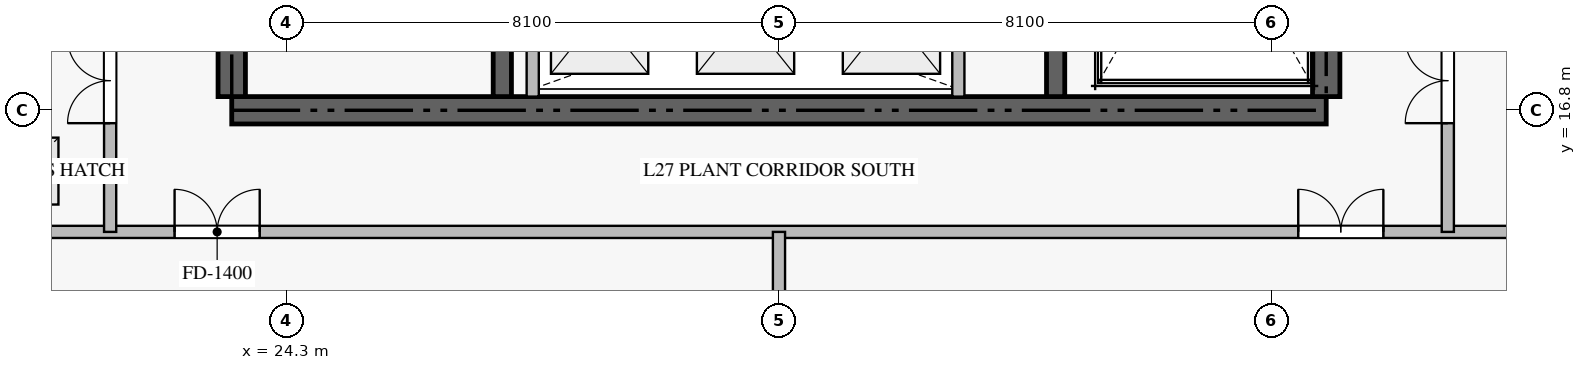
"""IFC4 building model, lengths in metres.
Left out: names, types, materials, properties, quantities, classifications, styles, units other than length and angle.
Written with IfcOpenShell. Run it as: python <this file> out.ifc"""

import sys

from ifc_helpers import new_model, si_unit, direction, frame, frame_2d, origin, origin_2d, place, context, subcontext, project, spatial, rectangle, extrude, source, transform, mapped, element, fill, save


model = new_model("IFC4")
c1 = context("Model", 3, precision=1e-05, world=origin(), true_north=direction((0.0, 1.0)))
c2 = subcontext(c1, "Body", "Model", "MODEL_VIEW")
j1 = project(units=[si_unit("LENGTHUNIT", "METRE"), si_unit("PLANEANGLEUNIT", "RADIAN")], contexts=[c1])
p1 = place(None, origin())
s1 = spatial("IfcSite", under=j1, at=p1, CompositionType="ELEMENT")
p2 = place(p1, origin())
s2 = spatial("IfcBuilding", under=s1, at=p2, CompositionType="ELEMENT")
p3 = place(p2, frame((0.0, 0.0, 109.2)))
s3 = spatial("IfcBuildingStorey", under=s2, at=p3, CompositionType="ELEMENT", Elevation=109.2)
p4 = place(p3, frame((23.4, 16.8, -0.36), z_axis=(0.0, 0.0, 1.0), x_axis=(1.0, 0.0, 0.0)))
e1 = element("IfcWall", 1, at=p4, inside=s3, PredefinedType="SHEAR", context=c2, shape_type="SweptSolid", body=[
    extrude(rectangle(XDim=18.0, YDim=0.45, at=frame_2d((9.0, 0.0))), origin(), (0.0, 0.0, 1.0), 5.998),
])
p5 = place(p3, frame((23.4, 17.025, -0.36), z_axis=(0.0, 0.0, 1.0), x_axis=(0.0, 1.0, 0.0)))
e2 = element("IfcWall", 2, at=p5, inside=s3, PredefinedType="SHEAR", context=c2, shape_type="SweptSolid", body=[
    extrude(rectangle(XDim=4.825, YDim=0.45, at=frame_2d((2.413, 0.0))), origin(), (0.0, 0.0, 1.0), 5.998),
])
p6 = place(p3, frame((41.4, 17.025, -0.36), z_axis=(0.0, 0.0, 1.0), x_axis=(0.0, 1.0, 0.0)))
e3 = element("IfcWall", 3, at=p6, inside=s3, PredefinedType="SHEAR", context=c2, shape_type="SweptSolid", body=[
    extrude(rectangle(XDim=8.325, YDim=0.45, at=frame_2d((4.163, 0.0))), origin(), (0.0, 0.0, 1.0), 5.998),
])
p7 = place(p3, frame((27.85, 17.025, -0.36), z_axis=(0.0, 0.0, 1.0), x_axis=(0.0, 1.0, 0.0)))
e4 = element("IfcWall", 4, at=p7, inside=s3, PredefinedType="SHEAR", context=c2, shape_type="SweptSolid", body=[
    extrude(rectangle(XDim=4.825, YDim=0.3, at=frame_2d((2.413, 0.0))), origin(), (0.0, 0.0, 1.0), 5.998),
])
p8 = place(p3, frame((36.95, 17.025, -0.36), z_axis=(0.0, 0.0, 1.0), x_axis=(0.0, 1.0, 0.0)))
e5 = element("IfcWall", 5, at=p8, inside=s3, PredefinedType="SHEAR", context=c2, shape_type="SweptSolid", body=[
    extrude(rectangle(XDim=8.325, YDim=0.3, at=frame_2d((4.163, 0.0))), origin(), (0.0, 0.0, 1.0), 5.998),
])
for number, where, z_axis, x_axis in (
    (6, (28.35, 17.025, 0.0), (0.0, 0.0, 1.0), (0.0, 1.0, 0.0)),
    (7, (35.35, 17.025, 0.0), (0.0, 0.0, 1.0), (0.0, 1.0, 0.0)),
):
    element("IfcWall", number, at=place(p3, frame(where, z_axis=z_axis, x_axis=x_axis)), inside=s3, PredefinedType="STANDARD", context=c2, shape_type="SweptSolid", body=[
        extrude(rectangle(XDim=2.525, YDim=0.2, at=frame_2d((1.263, 0.0))), origin(), (0.0, 0.0, 1.0), 5.64),
    ])
p9 = place(p3, frame((15.2, 14.8, 0.0), z_axis=(0.0, 0.0, 1.0), x_axis=(1.0, 0.0, 0.0)))
e8 = element("IfcWall", 8, at=p9, inside=s3, PredefinedType="STANDARD", context=c2, shape_type="SweptSolid", body=[
    extrude(rectangle(XDim=34.4, YDim=0.2, at=frame_2d((17.2, 0.0))), origin(), (0.0, 0.0, 1.0), 5.64),
])
p10 = place(p9, frame((7.26, 0.0, 0.0)))
e9 = element("IfcOpeningElement", 9, at=p10, cuts=e8, PredefinedType="OPENING", context=c2, shape_type="SweptSolid", body=[
    extrude(rectangle(XDim=1.4, YDim=2.2, at=frame_2d((0.7, 1.1))), frame((0.0, 0.11, 0.0), z_axis=(0.0, -1.0, 0.0), x_axis=(1.0, 0.0, 0.0)), (0.0, 0.0, 1.0), 0.22),
])
p11 = place(p9, frame((25.74, 0.0, 0.0)))
e10 = element("IfcOpeningElement", 10, at=p11, cuts=e8, PredefinedType="OPENING", context=c2, shape_type="SweptSolid", body=[
    extrude(rectangle(XDim=1.4, YDim=2.2, at=frame_2d((0.7, 1.1))), frame((0.0, 0.11, 0.0), z_axis=(0.0, -1.0, 0.0), x_axis=(1.0, 0.0, 0.0)), (0.0, 0.0, 1.0), 0.22),
])
p12 = place(p3, frame((32.4, 9.0, 0.0), z_axis=(0.0, 0.0, 1.0), x_axis=(0.0, 1.0, 0.0)))
e11 = element("IfcWall", 11, at=p12, inside=s3, PredefinedType="STANDARD", context=c2, shape_type="SweptSolid", body=[
    extrude(rectangle(XDim=5.8, YDim=0.2, at=frame_2d((2.9, 0.0))), origin(), (0.0, 0.0, 1.0), 5.64),
])
p13 = place(p3, frame((21.4, 14.8, 0.0), z_axis=(0.0, 0.0, 1.0), x_axis=(0.0, 1.0, 0.0)))
e12 = element("IfcWall", 12, at=p13, inside=s3, PredefinedType="STANDARD", context=c2, shape_type="SweptSolid", body=[
    extrude(rectangle(XDim=8.85, YDim=0.2, at=frame_2d((4.425, 0.0))), origin(), (0.0, 0.0, 1.0), 5.64),
])
p14 = place(p13, frame((1.788, 0.0, 0.0)))
e13 = element("IfcOpeningElement", 13, at=p14, cuts=e12, PredefinedType="OPENING", context=c2, shape_type="SweptSolid", body=[
    extrude(rectangle(XDim=1.4, YDim=2.2, at=frame_2d((0.7, 1.1))), frame((0.0, 0.11, 0.0), z_axis=(0.0, -1.0, 0.0), x_axis=(1.0, 0.0, 0.0)), (0.0, 0.0, 1.0), 0.22),
])
p15 = place(p3, frame((43.4, 14.8, 0.0), z_axis=(0.0, 0.0, 1.0), x_axis=(0.0, 1.0, 0.0)))
e14 = element("IfcWall", 14, at=p15, inside=s3, PredefinedType="STANDARD", context=c2, shape_type="SweptSolid", body=[
    extrude(rectangle(XDim=8.85, YDim=0.2, at=frame_2d((4.425, 0.0))), origin(), (0.0, 0.0, 1.0), 5.64),
])
p16 = place(p15, frame((1.788, 0.0, 0.0)))
e15 = element("IfcOpeningElement", 15, at=p16, cuts=e14, PredefinedType="OPENING", context=c2, shape_type="SweptSolid", body=[
    extrude(rectangle(XDim=1.4, YDim=2.2, at=frame_2d((0.7, 1.1))), frame((0.0, 0.11, 0.0), z_axis=(0.0, -1.0, 0.0), x_axis=(1.0, 0.0, 0.0)), (0.0, 0.0, 1.0), 0.22),
])
p17 = place(p2, frame((0.0, 0.0, 115.2)))
p18 = place(p17, frame((0.0, 0.0, -0.36)))
p19 = place(p18, frame((20.0, 15.8, 0.0)))
p20 = place(p19, frame((0.0, 0.0, 0.32)))
e16 = element("IfcDoor", 16, at=p20, inside=s3, OperationType="SINGLE_SWING_LEFT", PredefinedType="TRAPDOOR", context=c2, shape_type="SweptSolid", body=[
    extrude(rectangle(XDim=1.1, YDim=1.1, at=origin_2d()), origin(), (0.0, 0.0, 1.0), 0.04),
])
m1 = source(origin(), c2, "Body", "SweptSolid", [
    extrude(rectangle(XDim=1.4, YDim=2.2, at=frame_2d((0.7, 1.1))), frame((0.0, 0.025, 0.0), z_axis=(0.0, -1.0, 0.0), x_axis=(1.0, 0.0, 0.0)), (0.0, 0.0, 1.0), 0.05),
])
p21 = place(p10, origin())
e17 = element("IfcDoor", 17, at=p21, inside=s3, OperationType="DOUBLE_DOOR_SINGLE_SWING", PredefinedType="DOOR", context=c2, shape_type="MappedRepresentation", body=[
    mapped(m1, transform((0.0, 0.0, 0.0), scale=1.0)),
])
fill(e9, e17)
p22 = place(p11, origin())
e18 = element("IfcDoor", 18, at=p22, inside=s3, OperationType="DOUBLE_DOOR_SINGLE_SWING", PredefinedType="DOOR", context=c2, shape_type="MappedRepresentation", body=[
    mapped(m1, transform((0.0, 0.0, 0.0), scale=1.0)),
])
fill(e10, e18)
p23 = place(p14, origin())
e19 = element("IfcDoor", 19, at=p23, inside=s3, OperationType="DOUBLE_DOOR_SINGLE_SWING", PredefinedType="DOOR", context=c2, shape_type="MappedRepresentation", body=[
    mapped(m1, transform((0.0, 0.0, 0.0), scale=1.0)),
])
fill(e13, e19)
p24 = place(p16, origin())
e20 = element("IfcDoor", 20, at=p24, inside=s3, OperationType="DOUBLE_DOOR_SINGLE_SWING", PredefinedType="DOOR", context=c2, shape_type="MappedRepresentation", body=[
    mapped(m1, transform((0.0, 0.0, 0.0), scale=1.0)),
])
fill(e15, e20)
save(model, sys.argv[1])
